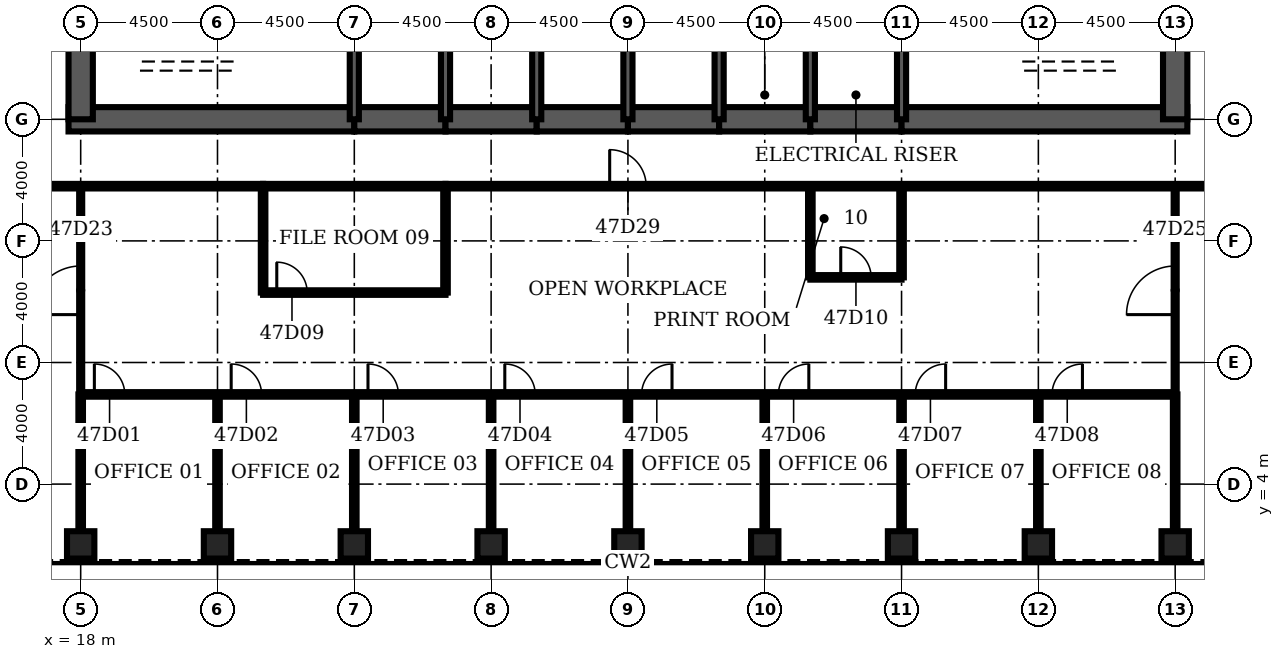
"""IFC4 building model, lengths in metres.
Left out: names, types, materials, properties, quantities, classifications, styles, units other than length and angle.
Written with IfcOpenShell. Run it as: python <this file> out.ifc"""

import sys

from ifc_helpers import new_model, si_unit, direction, frame, frame_2d, origin, origin_2d, place, context, subcontext, project, spatial, rectangle, hollow_rectangle, extrude, element, fill, save


model = new_model("IFC4")
c1 = context("Model", 3, precision=1e-05, world=origin(), true_north=direction((0.0, 1.0)))
c2 = subcontext(c1, "Body", "Model", "MODEL_VIEW")
j1 = project(units=[si_unit("LENGTHUNIT", "METRE"), si_unit("PLANEANGLEUNIT", "RADIAN")], contexts=[c1])
p1 = place(None, origin())
s1 = spatial("IfcSite", under=j1, at=p1, CompositionType="ELEMENT")
p2 = place(p1, origin())
s2 = spatial("IfcBuilding", under=s1, at=p2, CompositionType="ELEMENT")
p3 = place(p2, frame((0.0, 0.0, 211.0)))
s3 = spatial("IfcBuildingStorey", under=s2, at=p3, CompositionType="ELEMENT", Elevation=211.0)
for number, where, z_axis, x_axis in (
    (1, (18.0, 2.0, 0.0), (0.0, 0.0, 1.0), (0.0, 1.0, 0.0)),
    (2, (22.5, 2.0, 0.0), (0.0, 0.0, 1.0), (0.0, 1.0, 0.0)),
    (3, (27.0, 2.0, 0.0), (0.0, 0.0, 1.0), (0.0, 1.0, 0.0)),
    (4, (31.5, 2.0, 0.0), (0.0, 0.0, 1.0), (0.0, 1.0, 0.0)),
    (5, (36.0, 2.0, 0.0), (0.0, 0.0, 1.0), (0.0, 1.0, 0.0)),
    (6, (40.5, 2.0, 0.0), (0.0, 0.0, 1.0), (0.0, 1.0, 0.0)),
    (7, (45.0, 2.0, 0.0), (0.0, 0.0, 1.0), (0.0, 1.0, 0.0)),
    (8, (49.5, 2.0, 0.0), (0.0, 0.0, 1.0), (0.0, 1.0, 0.0)),
    (9, (54.0, 2.0, 0.0), (0.0, 0.0, 1.0), (0.0, 1.0, 0.0)),
):
    element("IfcColumn", number, at=place(p3, frame(where, z_axis=z_axis, x_axis=x_axis)), inside=s3, PredefinedType="COLUMN", context=c2, shape_type="SweptSolid", body=[
        extrude(hollow_rectangle(XDim=0.9, YDim=0.9, WallThickness=0.08, at=origin_2d()), origin(), (0.0, 0.0, 1.0), 4.2),
    ])
p4 = place(p3, frame((17.6, 16.0, 0.0), z_axis=(0.0, 0.0, 1.0), x_axis=(1.0, 0.0, 0.0)))
e10 = element("IfcWall", 10, at=p4, inside=s3, PredefinedType="SHEAR", context=c2, shape_type="SweptSolid", body=[
    extrude(rectangle(XDim=9.4, YDim=0.8, at=frame_2d((4.7, 0.0))), origin(), (0.0, 0.0, 1.0), 4.2),
])
for number, where, z_axis, x_axis in (
    (11, (27.0, 16.0, 0.0), (0.0, 0.0, 1.0), (1.0, 0.0, 0.0)),
    (12, (30.0, 16.0, 0.0), (0.0, 0.0, 1.0), (1.0, 0.0, 0.0)),
    (13, (33.0, 16.0, 0.0), (0.0, 0.0, 1.0), (1.0, 0.0, 0.0)),
    (14, (36.0, 16.0, 0.0), (0.0, 0.0, 1.0), (1.0, 0.0, 0.0)),
    (15, (39.0, 16.0, 0.0), (0.0, 0.0, 1.0), (1.0, 0.0, 0.0)),
    (16, (42.0, 16.0, 0.0), (0.0, 0.0, 1.0), (1.0, 0.0, 0.0)),
):
    element("IfcWall", number, at=place(p3, frame(where, z_axis=z_axis, x_axis=x_axis)), inside=s3, PredefinedType="SHEAR", context=c2, shape_type="SweptSolid", body=[
        extrude(rectangle(XDim=3.0, YDim=0.8, at=frame_2d((1.5, 0.0))), origin(), (0.0, 0.0, 1.0), 4.2),
    ])
p5 = place(p3, frame((45.0, 16.0, 0.0), z_axis=(0.0, 0.0, 1.0), x_axis=(1.0, 0.0, 0.0)))
e17 = element("IfcWall", 17, at=p5, inside=s3, PredefinedType="SHEAR", context=c2, shape_type="SweptSolid", body=[
    extrude(rectangle(XDim=9.4, YDim=0.8, at=frame_2d((4.7, 0.0))), origin(), (0.0, 0.0, 1.0), 4.2),
])
for number, where, z_axis, x_axis in (
    (18, (18.0, 19.2, 0.0), (0.0, 0.0, 1.0), (0.0, -1.0, 0.0)),
    (19, (54.0, 16.0, 0.0), (0.0, 0.0, 1.0), (0.0, 1.0, 0.0)),
):
    element("IfcWall", number, at=place(p3, frame(where, z_axis=z_axis, x_axis=x_axis)), inside=s3, PredefinedType="SHEAR", context=c2, shape_type="SweptSolid", body=[
        extrude(rectangle(XDim=3.2, YDim=0.8, at=frame_2d((1.6, 0.0))), origin(), (0.0, 0.0, 1.0), 4.2),
    ])
for number, where, z_axis, x_axis in (
    (20, (27.0, 16.0, 0.0), (0.0, 0.0, 1.0), (0.0, 1.0, 0.0)),
    (21, (30.0, 16.0, 0.0), (0.0, 0.0, 1.0), (0.0, 1.0, 0.0)),
    (22, (33.0, 16.0, 0.0), (0.0, 0.0, 1.0), (0.0, 1.0, 0.0)),
    (23, (36.0, 16.0, 0.0), (0.0, 0.0, 1.0), (0.0, 1.0, 0.0)),
    (24, (39.0, 16.0, 0.0), (0.0, 0.0, 1.0), (0.0, 1.0, 0.0)),
    (25, (42.0, 16.0, 0.0), (0.0, 0.0, 1.0), (0.0, 1.0, 0.0)),
    (26, (45.0, 16.0, 0.0), (0.0, 0.0, 1.0), (0.0, 1.0, 0.0)),
):
    element("IfcWall", number, at=place(p3, frame(where, z_axis=z_axis, x_axis=x_axis)), inside=s3, PredefinedType="SOLIDWALL", context=c2, shape_type="SweptSolid", body=[
        extrude(rectangle(XDim=3.2, YDim=0.3, at=frame_2d((1.6, 0.0))), origin(), (0.0, 0.0, 1.0), 4.2),
    ])
p6 = place(p3, frame((39.15, 17.35, 0.0), z_axis=(0.0, 0.0, 1.0), x_axis=(1.0, 0.0, 0.0)))
e27 = element("IfcWall", 27, at=p6, inside=s3, PredefinedType="SOLIDWALL", context=c2, shape_type="SweptSolid", body=[
    extrude(rectangle(XDim=2.7, YDim=0.3, at=frame_2d((1.35, 0.0))), origin(), (0.0, 0.0, 1.0), 4.04),
])
p7 = place(p6, frame((0.85, 0.0, 0.0)))
e28 = element("IfcOpeningElement", 28, at=p7, cuts=e27, PredefinedType="OPENING", context=c2, shape_type="SweptSolid", body=[
    extrude(rectangle(XDim=1.0, YDim=2.1, at=frame_2d((0.5, 1.05))), frame((0.0, 0.16, 0.0), z_axis=(0.0, -1.0, 0.0), x_axis=(1.0, 0.0, 0.0)), (0.0, 0.0, 1.0), 0.32),
])
p8 = place(p3, frame((42.15, 17.35, 0.0), z_axis=(0.0, 0.0, 1.0), x_axis=(1.0, 0.0, 0.0)))
e29 = element("IfcWall", 29, at=p8, inside=s3, PredefinedType="SOLIDWALL", context=c2, shape_type="SweptSolid", body=[
    extrude(rectangle(XDim=2.7, YDim=0.3, at=frame_2d((1.35, 0.0))), origin(), (0.0, 0.0, 1.0), 4.04),
])
p9 = place(p8, frame((0.85, 0.0, 0.0)))
e30 = element("IfcOpeningElement", 30, at=p9, cuts=e29, PredefinedType="OPENING", context=c2, shape_type="SweptSolid", body=[
    extrude(rectangle(XDim=1.0, YDim=2.1, at=frame_2d((0.5, 1.05))), frame((0.0, 0.16, 0.0), z_axis=(0.0, -1.0, 0.0), x_axis=(1.0, 0.0, 0.0)), (0.0, 0.0, 1.0), 0.32),
])
p10 = place(p3, frame((18.0, 6.95, 0.0), z_axis=(0.0, 0.0, 1.0), x_axis=(1.0, 0.0, 0.0)))
e31 = element("IfcWall", 31, at=p10, inside=s3, PredefinedType="PARTITIONING", context=c2, shape_type="SweptSolid", body=[
    extrude(rectangle(XDim=36.0, YDim=0.15, at=frame_2d((18.0, 0.0))), origin(), (0.0, 0.0, 1.0), 3.0),
])
p11 = place(p10, frame((0.45, 0.0, 0.0)))
e32 = element("IfcOpeningElement", 32, at=p11, cuts=e31, PredefinedType="OPENING", context=c2, shape_type="SweptSolid", body=[
    extrude(rectangle(XDim=1.0, YDim=2.1, at=frame_2d((0.5, 1.05))), frame((0.0, 0.085, 0.0), z_axis=(0.0, -1.0, 0.0), x_axis=(1.0, 0.0, 0.0)), (0.0, 0.0, 1.0), 0.17),
])
p12 = place(p10, frame((4.95, 0.0, 0.0)))
e33 = element("IfcOpeningElement", 33, at=p12, cuts=e31, PredefinedType="OPENING", context=c2, shape_type="SweptSolid", body=[
    extrude(rectangle(XDim=1.0, YDim=2.1, at=frame_2d((0.5, 1.05))), frame((0.0, 0.085, 0.0), z_axis=(0.0, -1.0, 0.0), x_axis=(1.0, 0.0, 0.0)), (0.0, 0.0, 1.0), 0.17),
])
p13 = place(p10, frame((9.45, 0.0, 0.0)))
e34 = element("IfcOpeningElement", 34, at=p13, cuts=e31, PredefinedType="OPENING", context=c2, shape_type="SweptSolid", body=[
    extrude(rectangle(XDim=1.0, YDim=2.1, at=frame_2d((0.5, 1.05))), frame((0.0, 0.085, 0.0), z_axis=(0.0, -1.0, 0.0), x_axis=(1.0, 0.0, 0.0)), (0.0, 0.0, 1.0), 0.17),
])
p14 = place(p10, frame((13.95, 0.0, 0.0)))
e35 = element("IfcOpeningElement", 35, at=p14, cuts=e31, PredefinedType="OPENING", context=c2, shape_type="SweptSolid", body=[
    extrude(rectangle(XDim=1.0, YDim=2.1, at=frame_2d((0.5, 1.05))), frame((0.0, 0.085, 0.0), z_axis=(0.0, -1.0, 0.0), x_axis=(1.0, 0.0, 0.0)), (0.0, 0.0, 1.0), 0.17),
])
p15 = place(p10, frame((18.45, 0.0, 0.0)))
e36 = element("IfcOpeningElement", 36, at=p15, cuts=e31, PredefinedType="OPENING", context=c2, shape_type="SweptSolid", body=[
    extrude(rectangle(XDim=1.0, YDim=2.1, at=frame_2d((0.5, 1.05))), frame((0.0, 0.085, 0.0), z_axis=(0.0, -1.0, 0.0), x_axis=(1.0, 0.0, 0.0)), (0.0, 0.0, 1.0), 0.17),
])
p16 = place(p10, frame((22.95, 0.0, 0.0)))
e37 = element("IfcOpeningElement", 37, at=p16, cuts=e31, PredefinedType="OPENING", context=c2, shape_type="SweptSolid", body=[
    extrude(rectangle(XDim=1.0, YDim=2.1, at=frame_2d((0.5, 1.05))), frame((0.0, 0.085, 0.0), z_axis=(0.0, -1.0, 0.0), x_axis=(1.0, 0.0, 0.0)), (0.0, 0.0, 1.0), 0.17),
])
p17 = place(p10, frame((27.45, 0.0, 0.0)))
e38 = element("IfcOpeningElement", 38, at=p17, cuts=e31, PredefinedType="OPENING", context=c2, shape_type="SweptSolid", body=[
    extrude(rectangle(XDim=1.0, YDim=2.1, at=frame_2d((0.5, 1.05))), frame((0.0, 0.085, 0.0), z_axis=(0.0, -1.0, 0.0), x_axis=(1.0, 0.0, 0.0)), (0.0, 0.0, 1.0), 0.17),
])
p18 = place(p10, frame((31.95, 0.0, 0.0)))
e39 = element("IfcOpeningElement", 39, at=p18, cuts=e31, PredefinedType="OPENING", context=c2, shape_type="SweptSolid", body=[
    extrude(rectangle(XDim=1.0, YDim=2.1, at=frame_2d((0.5, 1.05))), frame((0.0, 0.085, 0.0), z_axis=(0.0, -1.0, 0.0), x_axis=(1.0, 0.0, 0.0)), (0.0, 0.0, 1.0), 0.17),
])
p19 = place(p3, frame((24.0, 10.3, 0.0), z_axis=(0.0, 0.0, 1.0), x_axis=(1.0, 0.0, 0.0)))
e40 = element("IfcWall", 40, at=p19, inside=s3, PredefinedType="PARTITIONING", context=c2, shape_type="SweptSolid", body=[
    extrude(rectangle(XDim=6.0, YDim=0.15, at=frame_2d((3.0, 0.0))), origin(), (0.0, 0.0, 1.0), 3.0),
])
p20 = place(p19, frame((0.45, 0.0, 0.0)))
e41 = element("IfcOpeningElement", 41, at=p20, cuts=e40, PredefinedType="OPENING", context=c2, shape_type="SweptSolid", body=[
    extrude(rectangle(XDim=1.0, YDim=2.1, at=frame_2d((0.5, 1.05))), frame((0.0, 0.085, 0.0), z_axis=(0.0, -1.0, 0.0), x_axis=(1.0, 0.0, 0.0)), (0.0, 0.0, 1.0), 0.17),
])
p21 = place(p3, frame((42.0, 10.8, 0.0), z_axis=(0.0, 0.0, 1.0), x_axis=(1.0, 0.0, 0.0)))
e42 = element("IfcWall", 42, at=p21, inside=s3, PredefinedType="PARTITIONING", context=c2, shape_type="SweptSolid", body=[
    extrude(rectangle(XDim=3.0, YDim=0.15, at=frame_2d((1.5, 0.0))), origin(), (0.0, 0.0, 1.0), 3.0),
])
p22 = place(p21, frame((1.0, 0.0, 0.0)))
e43 = element("IfcOpeningElement", 43, at=p22, cuts=e42, PredefinedType="OPENING", context=c2, shape_type="SweptSolid", body=[
    extrude(rectangle(XDim=1.0, YDim=2.1, at=frame_2d((0.5, 1.05))), frame((0.0, 0.085, 0.0), z_axis=(0.0, -1.0, 0.0), x_axis=(1.0, 0.0, 0.0)), (0.0, 0.0, 1.0), 0.17),
])
p23 = place(p3, frame((15.2, 13.8, 0.0), z_axis=(0.0, 0.0, 1.0), x_axis=(1.0, 0.0, 0.0)))
e44 = element("IfcWall", 44, at=p23, inside=s3, PredefinedType="PARTITIONING", context=c2, shape_type="SweptSolid", body=[
    extrude(rectangle(XDim=8.8, YDim=0.15, at=frame_2d((4.4, 0.0))), origin(), (0.0, 0.0, 1.0), 3.0),
])
p24 = place(p3, frame((24.0, 13.8, 0.0), z_axis=(0.0, 0.0, 1.0), x_axis=(1.0, 0.0, 0.0)))
e45 = element("IfcWall", 45, at=p24, inside=s3, PredefinedType="PARTITIONING", context=c2, shape_type="SweptSolid", body=[
    extrude(rectangle(XDim=6.0, YDim=0.15, at=frame_2d((3.0, 0.0))), origin(), (0.0, 0.0, 1.0), 3.0),
])
p25 = place(p3, frame((30.0, 13.8, 0.0), z_axis=(0.0, 0.0, 1.0), x_axis=(1.0, 0.0, 0.0)))
e46 = element("IfcWall", 46, at=p25, inside=s3, PredefinedType="PARTITIONING", context=c2, shape_type="SweptSolid", body=[
    extrude(rectangle(XDim=26.8, YDim=0.15, at=frame_2d((13.4, 0.0))), origin(), (0.0, 0.0, 1.0), 3.0),
])
p26 = place(p25, frame((5.4, 0.0, 0.0)))
e47 = element("IfcOpeningElement", 47, at=p26, cuts=e46, PredefinedType="OPENING", context=c2, shape_type="SweptSolid", body=[
    extrude(rectangle(XDim=1.2, YDim=2.1, at=frame_2d((0.6, 1.05))), frame((0.0, 0.085, 0.0), z_axis=(0.0, -1.0, 0.0), x_axis=(1.0, 0.0, 0.0)), (0.0, 0.0, 1.0), 0.17),
])
p27 = place(p3, frame((18.0, 2.45, 0.0), z_axis=(0.0, 0.0, 1.0), x_axis=(0.0, 1.0, 0.0)))
e48 = element("IfcWall", 48, at=p27, inside=s3, PredefinedType="PARTITIONING", context=c2, shape_type="SweptSolid", body=[
    extrude(rectangle(XDim=4.5, YDim=0.15, at=frame_2d((2.25, 0.0))), origin(), (0.0, 0.0, 1.0), 3.0),
])
p28 = place(p3, frame((18.0, 6.95, 0.0), z_axis=(0.0, 0.0, 1.0), x_axis=(0.0, 1.0, 0.0)))
e49 = element("IfcWall", 49, at=p28, inside=s3, PredefinedType="PARTITIONING", context=c2, shape_type="SweptSolid", body=[
    extrude(rectangle(XDim=6.85, YDim=0.1, at=frame_2d((3.425, 0.0))), origin(), (0.0, 0.0, 1.0), 3.0),
])
p29 = place(p28, frame((2.625, 0.0, 0.0)))
e50 = element("IfcOpeningElement", 50, at=p29, cuts=e49, PredefinedType="OPENING", context=c2, shape_type="SweptSolid", body=[
    extrude(rectangle(XDim=1.6, YDim=2.1, at=frame_2d((0.8, 1.05))), frame((0.0, 0.06, 0.0), z_axis=(0.0, -1.0, 0.0), x_axis=(1.0, 0.0, 0.0)), (0.0, 0.0, 1.0), 0.12),
])
p30 = place(p3, frame((22.5, 2.45, 0.0), z_axis=(0.0, 0.0, 1.0), x_axis=(0.0, 1.0, 0.0)))
e51 = element("IfcWall", 51, at=p30, inside=s3, PredefinedType="PARTITIONING", context=c2, shape_type="SweptSolid", body=[
    extrude(rectangle(XDim=4.5, YDim=0.15, at=frame_2d((2.25, 0.0))), origin(), (0.0, 0.0, 1.0), 3.0),
])
p31 = place(p3, frame((24.0, 10.3, 0.0), z_axis=(0.0, 0.0, 1.0), x_axis=(0.0, 1.0, 0.0)))
e52 = element("IfcWall", 52, at=p31, inside=s3, PredefinedType="PARTITIONING", context=c2, shape_type="SweptSolid", body=[
    extrude(rectangle(XDim=3.5, YDim=0.15, at=frame_2d((1.75, 0.0))), origin(), (0.0, 0.0, 1.0), 3.0),
])
p32 = place(p3, frame((27.0, 2.45, 0.0), z_axis=(0.0, 0.0, 1.0), x_axis=(0.0, 1.0, 0.0)))
e53 = element("IfcWall", 53, at=p32, inside=s3, PredefinedType="PARTITIONING", context=c2, shape_type="SweptSolid", body=[
    extrude(rectangle(XDim=4.5, YDim=0.15, at=frame_2d((2.25, 0.0))), origin(), (0.0, 0.0, 1.0), 3.0),
])
p33 = place(p3, frame((30.0, 10.3, 0.0), z_axis=(0.0, 0.0, 1.0), x_axis=(0.0, 1.0, 0.0)))
e54 = element("IfcWall", 54, at=p33, inside=s3, PredefinedType="PARTITIONING", context=c2, shape_type="SweptSolid", body=[
    extrude(rectangle(XDim=3.5, YDim=0.15, at=frame_2d((1.75, 0.0))), origin(), (0.0, 0.0, 1.0), 3.0),
])
for number, where, z_axis, x_axis in (
    (55, (31.5, 2.45, 0.0), (0.0, 0.0, 1.0), (0.0, 1.0, 0.0)),
    (56, (36.0, 2.45, 0.0), (0.0, 0.0, 1.0), (0.0, 1.0, 0.0)),
    (57, (40.5, 2.45, 0.0), (0.0, 0.0, 1.0), (0.0, 1.0, 0.0)),
):
    element("IfcWall", number, at=place(p3, frame(where, z_axis=z_axis, x_axis=x_axis)), inside=s3, PredefinedType="PARTITIONING", context=c2, shape_type="SweptSolid", body=[
        extrude(rectangle(XDim=4.5, YDim=0.15, at=frame_2d((2.25, 0.0))), origin(), (0.0, 0.0, 1.0), 3.0),
    ])
p34 = place(p3, frame((42.0, 10.8, 0.0), z_axis=(0.0, 0.0, 1.0), x_axis=(0.0, 1.0, 0.0)))
e58 = element("IfcWall", 58, at=p34, inside=s3, PredefinedType="PARTITIONING", context=c2, shape_type="SweptSolid", body=[
    extrude(rectangle(XDim=3.0, YDim=0.15, at=frame_2d((1.5, 0.0))), origin(), (0.0, 0.0, 1.0), 3.0),
])
p35 = place(p3, frame((45.0, 2.45, 0.0), z_axis=(0.0, 0.0, 1.0), x_axis=(0.0, 1.0, 0.0)))
e59 = element("IfcWall", 59, at=p35, inside=s3, PredefinedType="PARTITIONING", context=c2, shape_type="SweptSolid", body=[
    extrude(rectangle(XDim=4.5, YDim=0.15, at=frame_2d((2.25, 0.0))), origin(), (0.0, 0.0, 1.0), 3.0),
])
p36 = place(p3, frame((45.0, 10.8, 0.0), z_axis=(0.0, 0.0, 1.0), x_axis=(0.0, 1.0, 0.0)))
e60 = element("IfcWall", 60, at=p36, inside=s3, PredefinedType="PARTITIONING", context=c2, shape_type="SweptSolid", body=[
    extrude(rectangle(XDim=3.0, YDim=0.15, at=frame_2d((1.5, 0.0))), origin(), (0.0, 0.0, 1.0), 3.0),
])
for number, where, z_axis, x_axis in (
    (61, (49.5, 2.45, 0.0), (0.0, 0.0, 1.0), (0.0, 1.0, 0.0)),
    (62, (54.0, 2.45, 0.0), (0.0, 0.0, 1.0), (0.0, 1.0, 0.0)),
):
    element("IfcWall", number, at=place(p3, frame(where, z_axis=z_axis, x_axis=x_axis)), inside=s3, PredefinedType="PARTITIONING", context=c2, shape_type="SweptSolid", body=[
        extrude(rectangle(XDim=4.5, YDim=0.15, at=frame_2d((2.25, 0.0))), origin(), (0.0, 0.0, 1.0), 3.0),
    ])
p37 = place(p3, frame((54.0, 6.95, 0.0), z_axis=(0.0, 0.0, 1.0), x_axis=(0.0, 1.0, 0.0)))
e63 = element("IfcWall", 63, at=p37, inside=s3, PredefinedType="PARTITIONING", context=c2, shape_type="SweptSolid", body=[
    extrude(rectangle(XDim=6.85, YDim=0.1, at=frame_2d((3.425, 0.0))), origin(), (0.0, 0.0, 1.0), 3.0),
])
p38 = place(p37, frame((2.625, 0.0, 0.0)))
e64 = element("IfcOpeningElement", 64, at=p38, cuts=e63, PredefinedType="OPENING", context=c2, shape_type="SweptSolid", body=[
    extrude(rectangle(XDim=1.6, YDim=2.1, at=frame_2d((0.8, 1.05))), frame((0.0, 0.06, 0.0), z_axis=(0.0, -1.0, 0.0), x_axis=(1.0, 0.0, 0.0)), (0.0, 0.0, 1.0), 0.12),
])
p39 = place(p7, origin())
e65 = element("IfcDoor", 65, at=p39, inside=s3, OperationType="SINGLE_SWING_LEFT", PredefinedType="DOOR", context=c2, shape_type="SweptSolid", body=[
    extrude(rectangle(XDim=1.0, YDim=2.1, at=frame_2d((0.5, 1.05))), frame((0.0, 0.025, 0.0), z_axis=(0.0, -1.0, 0.0), x_axis=(1.0, 0.0, 0.0)), (0.0, 0.0, 1.0), 0.05),
])
fill(e28, e65)
p40 = place(p9, origin())
e66 = element("IfcDoor", 66, at=p40, inside=s3, OperationType="SINGLE_SWING_LEFT", PredefinedType="DOOR", context=c2, shape_type="SweptSolid", body=[
    extrude(rectangle(XDim=1.0, YDim=2.1, at=frame_2d((0.5, 1.05))), frame((0.0, 0.025, 0.0), z_axis=(0.0, -1.0, 0.0), x_axis=(1.0, 0.0, 0.0)), (0.0, 0.0, 1.0), 0.05),
])
fill(e30, e66)
p41 = place(p11, origin())
e67 = element("IfcDoor", 67, at=p41, inside=s3, OperationType="SINGLE_SWING_LEFT", PredefinedType="DOOR", context=c2, shape_type="SweptSolid", body=[
    extrude(rectangle(XDim=1.0, YDim=2.1, at=frame_2d((0.5, 1.05))), frame((0.0, 0.025, 0.0), z_axis=(0.0, -1.0, 0.0), x_axis=(1.0, 0.0, 0.0)), (0.0, 0.0, 1.0), 0.05),
])
fill(e32, e67)
p42 = place(p12, origin())
e68 = element("IfcDoor", 68, at=p42, inside=s3, OperationType="SINGLE_SWING_LEFT", PredefinedType="DOOR", context=c2, shape_type="SweptSolid", body=[
    extrude(rectangle(XDim=1.0, YDim=2.1, at=frame_2d((0.5, 1.05))), frame((0.0, 0.025, 0.0), z_axis=(0.0, -1.0, 0.0), x_axis=(1.0, 0.0, 0.0)), (0.0, 0.0, 1.0), 0.05),
])
fill(e33, e68)
p43 = place(p13, origin())
e69 = element("IfcDoor", 69, at=p43, inside=s3, OperationType="SINGLE_SWING_LEFT", PredefinedType="DOOR", context=c2, shape_type="SweptSolid", body=[
    extrude(rectangle(XDim=1.0, YDim=2.1, at=frame_2d((0.5, 1.05))), frame((0.0, 0.025, 0.0), z_axis=(0.0, -1.0, 0.0), x_axis=(1.0, 0.0, 0.0)), (0.0, 0.0, 1.0), 0.05),
])
fill(e34, e69)
p44 = place(p14, origin())
e70 = element("IfcDoor", 70, at=p44, inside=s3, OperationType="SINGLE_SWING_LEFT", PredefinedType="DOOR", context=c2, shape_type="SweptSolid", body=[
    extrude(rectangle(XDim=1.0, YDim=2.1, at=frame_2d((0.5, 1.05))), frame((0.0, 0.025, 0.0), z_axis=(0.0, -1.0, 0.0), x_axis=(1.0, 0.0, 0.0)), (0.0, 0.0, 1.0), 0.05),
])
fill(e35, e70)
p45 = place(p15, origin())
e71 = element("IfcDoor", 71, at=p45, inside=s3, OperationType="SINGLE_SWING_RIGHT", PredefinedType="DOOR", context=c2, shape_type="SweptSolid", body=[
    extrude(rectangle(XDim=1.0, YDim=2.1, at=frame_2d((0.5, 1.05))), frame((0.0, 0.025, 0.0), z_axis=(0.0, -1.0, 0.0), x_axis=(1.0, 0.0, 0.0)), (0.0, 0.0, 1.0), 0.05),
])
fill(e36, e71)
p46 = place(p16, origin())
e72 = element("IfcDoor", 72, at=p46, inside=s3, OperationType="SINGLE_SWING_RIGHT", PredefinedType="DOOR", context=c2, shape_type="SweptSolid", body=[
    extrude(rectangle(XDim=1.0, YDim=2.1, at=frame_2d((0.5, 1.05))), frame((0.0, 0.025, 0.0), z_axis=(0.0, -1.0, 0.0), x_axis=(1.0, 0.0, 0.0)), (0.0, 0.0, 1.0), 0.05),
])
fill(e37, e72)
p47 = place(p17, origin())
e73 = element("IfcDoor", 73, at=p47, inside=s3, OperationType="SINGLE_SWING_RIGHT", PredefinedType="DOOR", context=c2, shape_type="SweptSolid", body=[
    extrude(rectangle(XDim=1.0, YDim=2.1, at=frame_2d((0.5, 1.05))), frame((0.0, 0.025, 0.0), z_axis=(0.0, -1.0, 0.0), x_axis=(1.0, 0.0, 0.0)), (0.0, 0.0, 1.0), 0.05),
])
fill(e38, e73)
p48 = place(p18, origin())
e74 = element("IfcDoor", 74, at=p48, inside=s3, OperationType="SINGLE_SWING_RIGHT", PredefinedType="DOOR", context=c2, shape_type="SweptSolid", body=[
    extrude(rectangle(XDim=1.0, YDim=2.1, at=frame_2d((0.5, 1.05))), frame((0.0, 0.025, 0.0), z_axis=(0.0, -1.0, 0.0), x_axis=(1.0, 0.0, 0.0)), (0.0, 0.0, 1.0), 0.05),
])
fill(e39, e74)
p49 = place(p20, origin())
e75 = element("IfcDoor", 75, at=p49, inside=s3, OperationType="SINGLE_SWING_LEFT", PredefinedType="DOOR", context=c2, shape_type="SweptSolid", body=[
    extrude(rectangle(XDim=1.0, YDim=2.1, at=frame_2d((0.5, 1.05))), frame((0.0, 0.025, 0.0), z_axis=(0.0, -1.0, 0.0), x_axis=(1.0, 0.0, 0.0)), (0.0, 0.0, 1.0), 0.05),
])
fill(e41, e75)
p50 = place(p22, origin())
e76 = element("IfcDoor", 76, at=p50, inside=s3, OperationType="SINGLE_SWING_LEFT", PredefinedType="DOOR", context=c2, shape_type="SweptSolid", body=[
    extrude(rectangle(XDim=1.0, YDim=2.1, at=frame_2d((0.5, 1.05))), frame((0.0, 0.025, 0.0), z_axis=(0.0, -1.0, 0.0), x_axis=(1.0, 0.0, 0.0)), (0.0, 0.0, 1.0), 0.05),
])
fill(e43, e76)
p51 = place(p29, origin())
e77 = element("IfcDoor", 77, at=p51, inside=s3, OperationType="SINGLE_SWING_LEFT", PredefinedType="DOOR", context=c2, shape_type="SweptSolid", body=[
    extrude(rectangle(XDim=1.6, YDim=2.1, at=frame_2d((0.8, 1.05))), frame((0.0, 0.025, 0.0), z_axis=(0.0, -1.0, 0.0), x_axis=(1.0, 0.0, 0.0)), (0.0, 0.0, 1.0), 0.05),
])
fill(e50, e77)
p52 = place(p38, origin())
e78 = element("IfcDoor", 78, at=p52, inside=s3, OperationType="SINGLE_SWING_LEFT", PredefinedType="DOOR", context=c2, shape_type="SweptSolid", body=[
    extrude(rectangle(XDim=1.6, YDim=2.1, at=frame_2d((0.8, 1.05))), frame((0.0, 0.025, 0.0), z_axis=(0.0, -1.0, 0.0), x_axis=(1.0, 0.0, 0.0)), (0.0, 0.0, 1.0), 0.05),
])
fill(e64, e78)
p53 = place(p26, origin())
e79 = element("IfcDoor", 79, at=p53, inside=s3, OperationType="SINGLE_SWING_LEFT", PredefinedType="DOOR", context=c2, shape_type="SweptSolid", body=[
    extrude(rectangle(XDim=1.2, YDim=2.1, at=frame_2d((0.6, 1.05))), frame((0.0, 0.025, 0.0), z_axis=(0.0, -1.0, 0.0), x_axis=(1.0, 0.0, 0.0)), (0.0, 0.0, 1.0), 0.05),
])
fill(e47, e79)
save(model, sys.argv[1])
